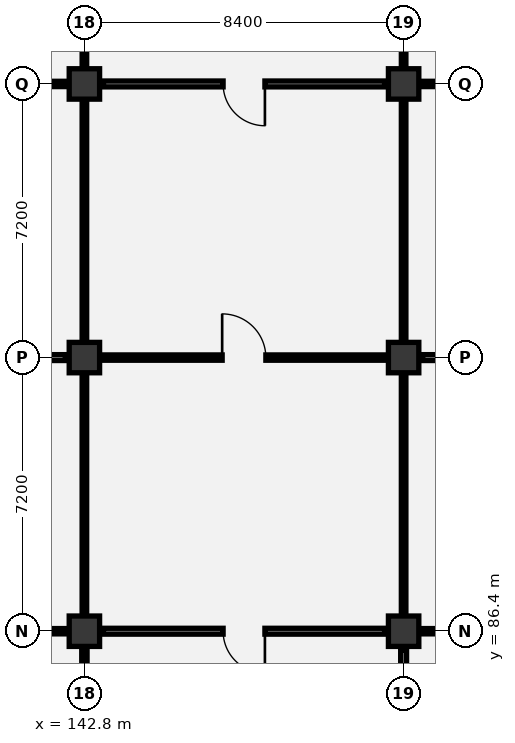
"""IFC4 building model, lengths in metres.
Left out: names, types, materials, properties, quantities, classifications, styles, units other than length and angle.
Written with IfcOpenShell. Run it as: python <this file> out.ifc"""

import sys

from ifc_helpers import new_model, si_unit, direction, frame, frame_2d, origin, origin_2d, place, context, subcontext, project, spatial, rectangle, extrude, element, fill, save


model = new_model("IFC4")
c1 = context("Model", 3, precision=1e-05, world=origin(), true_north=direction((0.0, 1.0)))
c2 = subcontext(c1, "Body", "Model", "MODEL_VIEW")
j1 = project(units=[si_unit("LENGTHUNIT", "METRE"), si_unit("PLANEANGLEUNIT", "RADIAN")], contexts=[c1])
p1 = place(None, origin())
s1 = spatial("IfcSite", under=j1, at=p1, CompositionType="ELEMENT")
p2 = place(p1, origin())
s2 = spatial("IfcBuilding", under=s1, at=p2, CompositionType="ELEMENT")
p3 = place(p2, frame((0.0, 0.0, -4.8)))
s3 = spatial("IfcBuildingStorey", under=s2, at=p3, CompositionType="ELEMENT", Elevation=-4.8)
for number, where, z_axis, x_axis in (
    (1, (142.8, 86.4, 0.0), (0.0, 0.0, 1.0), (1.0, 0.0, 0.0)),
    (2, (142.8, 93.6, 0.0), (0.0, 0.0, 1.0), (1.0, 0.0, 0.0)),
    (3, (142.8, 100.8, 0.0), (0.0, 0.0, 1.0), (1.0, 0.0, 0.0)),
    (4, (151.2, 86.4, 0.0), (0.0, 0.0, 1.0), (1.0, 0.0, 0.0)),
    (5, (151.2, 93.6, 0.0), (0.0, 0.0, 1.0), (1.0, 0.0, 0.0)),
    (6, (151.2, 100.8, 0.0), (0.0, 0.0, 1.0), (1.0, 0.0, 0.0)),
):
    element("IfcColumn", number, at=place(p3, frame(where, z_axis=z_axis, x_axis=x_axis)), inside=s3, PredefinedType="COLUMN", context=c2, shape_type="SweptSolid", body=[
        extrude(rectangle(XDim=0.8, YDim=0.8, at=origin_2d()), origin(), (0.0, 0.0, 1.0), 4.8),
    ])
p4 = place(p3, frame((142.8, 79.7, 0.0), z_axis=(0.0, 0.0, 1.0), x_axis=(0.0, 1.0, 0.0)))
e7 = element("IfcWall", 7, at=p4, inside=s3, PredefinedType="PARTITIONING", context=c2, shape_type="SweptSolid", body=[
    extrude(rectangle(XDim=6.2, YDim=0.14, at=frame_2d((3.1, 0.0))), origin(), (0.0, 0.0, 1.0), 3.645),
])
p5 = place(p4, frame((2.525, 0.0, 0.0)))
e8 = element("IfcOpeningElement", 8, at=p5, cuts=e7, PredefinedType="OPENING", context=c2, shape_type="SweptSolid", body=[
    extrude(rectangle(XDim=1.15, YDim=2.1, at=frame_2d((0.575, 1.05))), frame((0.0, 0.08, 0.0), z_axis=(0.0, -1.0, 0.0), x_axis=(1.0, 0.0, 0.0)), (0.0, 0.0, 1.0), 0.16),
])
p6 = place(p3, frame((134.9, 86.4, 0.0), z_axis=(0.0, 0.0, 1.0), x_axis=(1.0, 0.0, 0.0)))
e9 = element("IfcWall", 9, at=p6, inside=s3, PredefinedType="PARTITIONING", context=c2, shape_type="SweptSolid", body=[
    extrude(rectangle(XDim=7.4, YDim=0.14, at=frame_2d((3.7, 0.0))), origin(), (0.0, 0.0, 1.0), 3.545),
])
p7 = place(p6, frame((3.15, 0.0, 0.0)))
e10 = element("IfcOpeningElement", 10, at=p7, cuts=e9, PredefinedType="OPENING", context=c2, shape_type="SweptSolid", body=[
    extrude(rectangle(XDim=1.1, YDim=2.1, at=frame_2d((0.55, 1.05))), frame((0.0, 0.08, 0.0), z_axis=(0.0, -1.0, 0.0), x_axis=(1.0, 0.0, 0.0)), (0.0, 0.0, 1.0), 0.16),
])
p8 = place(p3, frame((142.8, 86.9, 0.0), z_axis=(0.0, 0.0, 1.0), x_axis=(0.0, 1.0, 0.0)))
e11 = element("IfcWall", 11, at=p8, inside=s3, PredefinedType="PARTITIONING", context=c2, shape_type="SweptSolid", body=[
    extrude(rectangle(XDim=6.2, YDim=0.12, at=frame_2d((3.1, 0.0))), origin(), (0.0, 0.0, 1.0), 3.645),
])
p9 = place(p3, frame((134.9, 93.6, 0.0), z_axis=(0.0, 0.0, 1.0), x_axis=(1.0, 0.0, 0.0)))
e12 = element("IfcWall", 12, at=p9, inside=s3, PredefinedType="PARTITIONING", context=c2, shape_type="SweptSolid", body=[
    extrude(rectangle(XDim=7.4, YDim=0.155, at=frame_2d((3.7, 0.0))), origin(), (0.0, 0.0, 1.0), 3.545),
])
p10 = place(p9, frame((3.125, 0.0, 0.0)))
e13 = element("IfcOpeningElement", 13, at=p10, cuts=e12, PredefinedType="OPENING", context=c2, shape_type="SweptSolid", body=[
    extrude(rectangle(XDim=1.15, YDim=2.1, at=frame_2d((0.575, 1.05))), frame((0.0, 0.087, 0.0), z_axis=(0.0, -1.0, 0.0), x_axis=(1.0, 0.0, 0.0)), (0.0, 0.0, 1.0), 0.175),
])
p11 = place(p3, frame((142.8, 94.1, 0.0), z_axis=(0.0, 0.0, 1.0), x_axis=(0.0, 1.0, 0.0)))
e14 = element("IfcWall", 14, at=p11, inside=s3, PredefinedType="PARTITIONING", context=c2, shape_type="SweptSolid", body=[
    extrude(rectangle(XDim=6.2, YDim=0.12, at=frame_2d((3.1, 0.0))), origin(), (0.0, 0.0, 1.0), 3.645),
])
p12 = place(p3, frame((134.9, 100.8, 0.0), z_axis=(0.0, 0.0, 1.0), x_axis=(1.0, 0.0, 0.0)))
e15 = element("IfcWall", 15, at=p12, inside=s3, PredefinedType="PARTITIONING", context=c2, shape_type="SweptSolid", body=[
    extrude(rectangle(XDim=7.4, YDim=0.14, at=frame_2d((3.7, 0.0))), origin(), (0.0, 0.0, 1.0), 3.545),
])
p13 = place(p12, frame((3.15, 0.0, 0.0)))
e16 = element("IfcOpeningElement", 16, at=p13, cuts=e15, PredefinedType="OPENING", context=c2, shape_type="SweptSolid", body=[
    extrude(rectangle(XDim=1.1, YDim=2.1, at=frame_2d((0.55, 1.05))), frame((0.0, 0.08, 0.0), z_axis=(0.0, -1.0, 0.0), x_axis=(1.0, 0.0, 0.0)), (0.0, 0.0, 1.0), 0.16),
])
p14 = place(p3, frame((142.8, 101.3, 0.0), z_axis=(0.0, 0.0, 1.0), x_axis=(0.0, 1.0, 0.0)))
e17 = element("IfcWall", 17, at=p14, inside=s3, PredefinedType="PARTITIONING", context=c2, shape_type="SweptSolid", body=[
    extrude(rectangle(XDim=6.2, YDim=0.12, at=frame_2d((3.1, 0.0))), origin(), (0.0, 0.0, 1.0), 3.645),
])
p15 = place(p3, frame((151.2, 79.7, 0.0), z_axis=(0.0, 0.0, 1.0), x_axis=(0.0, 1.0, 0.0)))
e18 = element("IfcWall", 18, at=p15, inside=s3, PredefinedType="PARTITIONING", context=c2, shape_type="SweptSolid", body=[
    extrude(rectangle(XDim=6.2, YDim=0.155, at=frame_2d((3.1, 0.0))), origin(), (0.0, 0.0, 1.0), 3.645),
])
p16 = place(p15, frame((2.525, 0.0, 0.0)))
e19 = element("IfcOpeningElement", 19, at=p16, cuts=e18, PredefinedType="OPENING", context=c2, shape_type="SweptSolid", body=[
    extrude(rectangle(XDim=1.15, YDim=2.1, at=frame_2d((0.575, 1.05))), frame((0.0, 0.087, 0.0), z_axis=(0.0, -1.0, 0.0), x_axis=(1.0, 0.0, 0.0)), (0.0, 0.0, 1.0), 0.175),
])
p17 = place(p3, frame((143.3, 86.4, 0.0), z_axis=(0.0, 0.0, 1.0), x_axis=(1.0, 0.0, 0.0)))
e20 = element("IfcWall", 20, at=p17, inside=s3, PredefinedType="PARTITIONING", context=c2, shape_type="SweptSolid", body=[
    extrude(rectangle(XDim=7.4, YDim=0.155, at=frame_2d((3.7, 0.0))), origin(), (0.0, 0.0, 1.0), 3.545),
])
p18 = place(p17, frame((3.15, 0.0, 0.0)))
e21 = element("IfcOpeningElement", 21, at=p18, cuts=e20, PredefinedType="OPENING", context=c2, shape_type="SweptSolid", body=[
    extrude(rectangle(XDim=1.1, YDim=2.1, at=frame_2d((0.55, 1.05))), frame((0.0, 0.087, 0.0), z_axis=(0.0, -1.0, 0.0), x_axis=(1.0, 0.0, 0.0)), (0.0, 0.0, 1.0), 0.175),
])
p19 = place(p3, frame((151.2, 86.9, 0.0), z_axis=(0.0, 0.0, 1.0), x_axis=(0.0, 1.0, 0.0)))
e22 = element("IfcWall", 22, at=p19, inside=s3, PredefinedType="PARTITIONING", context=c2, shape_type="SweptSolid", body=[
    extrude(rectangle(XDim=6.2, YDim=0.12, at=frame_2d((3.1, 0.0))), origin(), (0.0, 0.0, 1.0), 3.645),
])
p20 = place(p3, frame((143.3, 93.6, 0.0), z_axis=(0.0, 0.0, 1.0), x_axis=(1.0, 0.0, 0.0)))
e23 = element("IfcWall", 23, at=p20, inside=s3, PredefinedType="PARTITIONING", context=c2, shape_type="SweptSolid", body=[
    extrude(rectangle(XDim=7.4, YDim=0.14, at=frame_2d((3.7, 0.0))), origin(), (0.0, 0.0, 1.0), 3.545),
])
p21 = place(p20, frame((3.125, 0.0, 0.0)))
e24 = element("IfcOpeningElement", 24, at=p21, cuts=e23, PredefinedType="OPENING", context=c2, shape_type="SweptSolid", body=[
    extrude(rectangle(XDim=1.15, YDim=2.1, at=frame_2d((0.575, 1.05))), frame((0.0, 0.08, 0.0), z_axis=(0.0, -1.0, 0.0), x_axis=(1.0, 0.0, 0.0)), (0.0, 0.0, 1.0), 0.16),
])
p22 = place(p3, frame((151.2, 94.1, 0.0), z_axis=(0.0, 0.0, 1.0), x_axis=(0.0, 1.0, 0.0)))
e25 = element("IfcWall", 25, at=p22, inside=s3, PredefinedType="PARTITIONING", context=c2, shape_type="SweptSolid", body=[
    extrude(rectangle(XDim=6.2, YDim=0.12, at=frame_2d((3.1, 0.0))), origin(), (0.0, 0.0, 1.0), 3.645),
])
p23 = place(p3, frame((143.3, 100.8, 0.0), z_axis=(0.0, 0.0, 1.0), x_axis=(1.0, 0.0, 0.0)))
e26 = element("IfcWall", 26, at=p23, inside=s3, PredefinedType="PARTITIONING", context=c2, shape_type="SweptSolid", body=[
    extrude(rectangle(XDim=7.4, YDim=0.155, at=frame_2d((3.7, 0.0))), origin(), (0.0, 0.0, 1.0), 3.545),
])
p24 = place(p23, frame((3.15, 0.0, 0.0)))
e27 = element("IfcOpeningElement", 27, at=p24, cuts=e26, PredefinedType="OPENING", context=c2, shape_type="SweptSolid", body=[
    extrude(rectangle(XDim=1.1, YDim=2.1, at=frame_2d((0.55, 1.05))), frame((0.0, 0.087, 0.0), z_axis=(0.0, -1.0, 0.0), x_axis=(1.0, 0.0, 0.0)), (0.0, 0.0, 1.0), 0.175),
])
p25 = place(p3, frame((151.2, 101.3, 0.0), z_axis=(0.0, 0.0, 1.0), x_axis=(0.0, 1.0, 0.0)))
e28 = element("IfcWall", 28, at=p25, inside=s3, PredefinedType="PARTITIONING", context=c2, shape_type="SweptSolid", body=[
    extrude(rectangle(XDim=6.2, YDim=0.12, at=frame_2d((3.1, 0.0))), origin(), (0.0, 0.0, 1.0), 3.645),
])
p26 = place(p3, frame((151.7, 86.4, 0.0), z_axis=(0.0, 0.0, 1.0), x_axis=(1.0, 0.0, 0.0)))
e29 = element("IfcWall", 29, at=p26, inside=s3, PredefinedType="PARTITIONING", context=c2, shape_type="SweptSolid", body=[
    extrude(rectangle(XDim=7.4, YDim=0.14, at=frame_2d((3.7, 0.0))), origin(), (0.0, 0.0, 1.0), 3.545),
])
p27 = place(p26, frame((3.15, 0.0, 0.0)))
e30 = element("IfcOpeningElement", 30, at=p27, cuts=e29, PredefinedType="OPENING", context=c2, shape_type="SweptSolid", body=[
    extrude(rectangle(XDim=1.1, YDim=2.1, at=frame_2d((0.55, 1.05))), frame((0.0, 0.08, 0.0), z_axis=(0.0, -1.0, 0.0), x_axis=(1.0, 0.0, 0.0)), (0.0, 0.0, 1.0), 0.16),
])
p28 = place(p3, frame((151.7, 93.6, 0.0), z_axis=(0.0, 0.0, 1.0), x_axis=(1.0, 0.0, 0.0)))
e31 = element("IfcWall", 31, at=p28, inside=s3, PredefinedType="PARTITIONING", context=c2, shape_type="SweptSolid", body=[
    extrude(rectangle(XDim=7.4, YDim=0.155, at=frame_2d((3.7, 0.0))), origin(), (0.0, 0.0, 1.0), 3.545),
])
p29 = place(p28, frame((3.125, 0.0, 0.0)))
e32 = element("IfcOpeningElement", 32, at=p29, cuts=e31, PredefinedType="OPENING", context=c2, shape_type="SweptSolid", body=[
    extrude(rectangle(XDim=1.15, YDim=2.1, at=frame_2d((0.575, 1.05))), frame((0.0, 0.087, 0.0), z_axis=(0.0, -1.0, 0.0), x_axis=(1.0, 0.0, 0.0)), (0.0, 0.0, 1.0), 0.175),
])
p30 = place(p3, frame((151.7, 100.8, 0.0), z_axis=(0.0, 0.0, 1.0), x_axis=(1.0, 0.0, 0.0)))
e33 = element("IfcWall", 33, at=p30, inside=s3, PredefinedType="PARTITIONING", context=c2, shape_type="SweptSolid", body=[
    extrude(rectangle(XDim=7.4, YDim=0.14, at=frame_2d((3.7, 0.0))), origin(), (0.0, 0.0, 1.0), 3.545),
])
p31 = place(p30, frame((3.15, 0.0, 0.0)))
e34 = element("IfcOpeningElement", 34, at=p31, cuts=e33, PredefinedType="OPENING", context=c2, shape_type="SweptSolid", body=[
    extrude(rectangle(XDim=1.1, YDim=2.1, at=frame_2d((0.55, 1.05))), frame((0.0, 0.08, 0.0), z_axis=(0.0, -1.0, 0.0), x_axis=(1.0, 0.0, 0.0)), (0.0, 0.0, 1.0), 0.16),
])
p32 = place(p18, frame((1.1, 0.0, 0.0), z_axis=(0.0, 0.0, 1.0), x_axis=(-1.0, 0.0, 0.0)))
e35 = element("IfcDoor", 35, at=p32, inside=s3, OperationType="SINGLE_SWING_LEFT", PredefinedType="DOOR", context=c2, shape_type="SweptSolid", body=[
    extrude(rectangle(XDim=1.1, YDim=2.1, at=frame_2d((0.55, 1.05))), frame((0.0, 0.025, 0.0), z_axis=(0.0, -1.0, 0.0), x_axis=(1.0, 0.0, 0.0)), (0.0, 0.0, 1.0), 0.05),
])
fill(e21, e35)
p33 = place(p21, origin())
e36 = element("IfcDoor", 36, at=p33, inside=s3, OperationType="SINGLE_SWING_LEFT", PredefinedType="DOOR", context=c2, shape_type="SweptSolid", body=[
    extrude(rectangle(XDim=1.15, YDim=2.1, at=frame_2d((0.575, 1.05))), frame((0.0, 0.025, 0.0), z_axis=(0.0, -1.0, 0.0), x_axis=(1.0, 0.0, 0.0)), (0.0, 0.0, 1.0), 0.05),
])
fill(e24, e36)
p34 = place(p24, frame((1.1, 0.0, 0.0), z_axis=(0.0, 0.0, 1.0), x_axis=(-1.0, 0.0, 0.0)))
e37 = element("IfcDoor", 37, at=p34, inside=s3, OperationType="SINGLE_SWING_LEFT", PredefinedType="DOOR", context=c2, shape_type="SweptSolid", body=[
    extrude(rectangle(XDim=1.1, YDim=2.1, at=frame_2d((0.55, 1.05))), frame((0.0, 0.025, 0.0), z_axis=(0.0, -1.0, 0.0), x_axis=(1.0, 0.0, 0.0)), (0.0, 0.0, 1.0), 0.05),
])
fill(e27, e37)
save(model, sys.argv[1])
